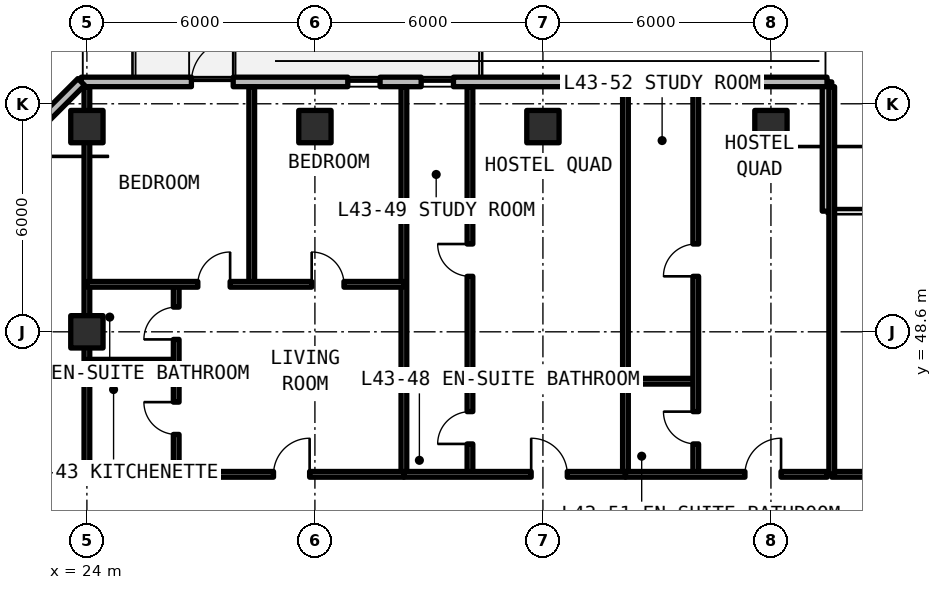
"""IFC4 building model, lengths in metres.
Left out: names, types, materials, properties, quantities, classifications, styles, units other than length and angle.
Written with IfcOpenShell. Run it as: python <this file> out.ifc"""

import sys

from ifc_helpers import new_model, si_unit, direction, frame, frame_2d, origin, origin_2d, place, context, subcontext, project, spatial, rectangle, extrude, element, fill, save


model = new_model("IFC4")
c1 = context("Model", 3, precision=1e-05, world=origin(), true_north=direction((0.0, 1.0)))
c2 = subcontext(c1, "Body", "Model", "MODEL_VIEW")
j1 = project(units=[si_unit("LENGTHUNIT", "METRE"), si_unit("PLANEANGLEUNIT", "RADIAN")], contexts=[c1])
p1 = place(None, origin())
s1 = spatial("IfcSite", under=j1, at=p1, CompositionType="ELEMENT")
p2 = place(p1, origin())
s2 = spatial("IfcBuilding", under=s1, at=p2, CompositionType="ELEMENT")
p3 = place(p2, frame((0.0, 0.0, 155.1)))
s3 = spatial("IfcBuildingStorey", under=s2, at=p3, CompositionType="ELEMENT", Elevation=155.1)
for number, where, z_axis, x_axis in (
    (1, (24.0, 48.6, 0.0), (0.0, 0.0, 1.0), (1.0, 0.0, 0.0)),
    (2, (24.0, 54.0, 0.0), (0.0, 0.0, 1.0), (1.0, 0.0, 0.0)),
    (3, (30.0, 54.0, 0.0), (0.0, 0.0, 1.0), (1.0, 0.0, 0.0)),
    (4, (36.0, 54.0, 0.0), (0.0, 0.0, 1.0), (1.0, 0.0, 0.0)),
    (5, (42.0, 54.0, 0.0), (0.0, 0.0, 1.0), (1.0, 0.0, 0.0)),
):
    element("IfcColumn", number, at=place(p3, frame(where, z_axis=z_axis, x_axis=x_axis)), inside=s3, PredefinedType="COLUMN", context=c2, shape_type="SweptSolid", body=[
        extrude(rectangle(XDim=0.85, YDim=0.85, at=origin_2d()), origin(), (0.0, 0.0, 1.0), 3.3),
    ])
p4 = place(p3, frame((43.475, 51.775, 0.0), z_axis=(0.0, 0.0, 1.0), x_axis=(0.0, 1.0, 0.0)))
e6 = element("IfcWall", 6, at=p4, inside=s3, PredefinedType="SOLIDWALL", context=c2, shape_type="SweptSolid", body=[
    extrude(rectangle(XDim=3.4, YDim=0.25, at=frame_2d((1.7, 0.0))), origin(), (0.0, 0.0, 1.0), 3.08),
])
p5 = place(p3, frame((43.475, 55.175, 0.0), z_axis=(0.0, 0.0, 1.0), x_axis=(-1.0, 0.0, 0.0)))
e7 = element("IfcWall", 7, at=p5, inside=s3, PredefinedType="SOLIDWALL", context=c2, shape_type="SweptSolid", body=[
    extrude(rectangle(XDim=19.623, YDim=0.25, at=frame_2d((9.812, 0.0))), origin(), (0.0, 0.0, 1.0), 3.08),
])
p6 = place(p5, frame((15.625, 0.0, 0.0)))
e8 = element("IfcOpeningElement", 8, at=p6, cuts=e7, PredefinedType="OPENING", context=c2, shape_type="SweptSolid", body=[
    extrude(rectangle(XDim=1.1, YDim=2.15, at=frame_2d((0.55, 1.075))), frame((0.0, 0.135, 0.0), z_axis=(0.0, -1.0, 0.0), x_axis=(1.0, 0.0, 0.0)), (0.0, 0.0, 1.0), 0.27),
])
p7 = place(p5, frame((11.76, 0.0, 0.78)))
e9 = element("IfcOpeningElement", 9, at=p7, cuts=e7, PredefinedType="OPENING", context=c2, shape_type="SweptSolid", body=[
    extrude(rectangle(XDim=0.85, YDim=1.65, at=frame_2d((0.425, 0.825))), frame((0.0, 0.135, 0.0), z_axis=(0.0, -1.0, 0.0), x_axis=(1.0, 0.0, 0.0)), (0.0, 0.0, 1.0), 0.27),
])
p8 = place(p5, frame((9.829, 0.0, 0.78)))
e10 = element("IfcOpeningElement", 10, at=p8, cuts=e7, PredefinedType="OPENING", context=c2, shape_type="SweptSolid", body=[
    extrude(rectangle(XDim=0.85, YDim=1.65, at=frame_2d((0.425, 0.825))), frame((0.0, 0.135, 0.0), z_axis=(0.0, -1.0, 0.0), x_axis=(1.0, 0.0, 0.0)), (0.0, 0.0, 1.0), 0.27),
])
p9 = place(p5, frame((5.974, 0.0, 0.78)))
e11 = element("IfcOpeningElement", 11, at=p9, cuts=e7, PredefinedType="OPENING", context=c2, shape_type="SweptSolid", body=[
    extrude(rectangle(XDim=0.85, YDim=1.65, at=frame_2d((0.425, 0.825))), frame((0.0, 0.135, 0.0), z_axis=(0.0, -1.0, 0.0), x_axis=(1.0, 0.0, 0.0)), (0.0, 0.0, 1.0), 0.27),
])
p10 = place(p5, frame((3.943, 0.0, 0.78)))
e12 = element("IfcOpeningElement", 12, at=p10, cuts=e7, PredefinedType="OPENING", context=c2, shape_type="SweptSolid", body=[
    extrude(rectangle(XDim=0.85, YDim=1.65, at=frame_2d((0.425, 0.825))), frame((0.0, 0.135, 0.0), z_axis=(0.0, -1.0, 0.0), x_axis=(1.0, 0.0, 0.0)), (0.0, 0.0, 1.0), 0.27),
])
p11 = place(p5, frame((2.109, 0.0, 0.78)))
e13 = element("IfcOpeningElement", 13, at=p11, cuts=e7, PredefinedType="OPENING", context=c2, shape_type="SweptSolid", body=[
    extrude(rectangle(XDim=0.85, YDim=1.65, at=frame_2d((0.425, 0.825))), frame((0.0, 0.135, 0.0), z_axis=(0.0, -1.0, 0.0), x_axis=(1.0, 0.0, 0.0)), (0.0, 0.0, 1.0), 0.27),
])
p12 = place(p3, frame((23.852, 55.175, 0.0), z_axis=(0.0, 0.0, 1.0), x_axis=(-0.70708586489, -0.707127696864, 0.0)))
e14 = element("IfcWall", 14, at=p12, inside=s3, PredefinedType="SOLIDWALL", context=c2, shape_type="SweptSolid", body=[
    extrude(rectangle(XDim=5.836, YDim=0.25, at=frame_2d((2.918, 0.0))), origin(), (0.0, 0.0, 1.0), 3.08),
])
p13 = place(p12, frame((1.538, 0.0, 0.78)))
e15 = element("IfcOpeningElement", 15, at=p13, cuts=e14, PredefinedType="OPENING", context=c2, shape_type="SweptSolid", body=[
    extrude(rectangle(XDim=3.4, YDim=1.66, at=frame_2d((1.7, 0.83))), frame((0.0, 0.135, 0.0), z_axis=(0.0, -1.0, 0.0), x_axis=(1.0, 0.0, 0.0)), (0.0, 0.0, 1.0), 0.27),
])
p14 = place(p3, frame((43.6, 44.85, 0.0), z_axis=(0.0, 0.0, 1.0), x_axis=(1.0, 0.0, 0.0)))
e16 = element("IfcWall", 16, at=p14, inside=s3, PredefinedType="SOLIDWALL", context=c2, shape_type="SweptSolid", body=[
    extrude(rectangle(XDim=8.4, YDim=0.15, at=frame_2d((4.2, 0.0))), origin(), (0.0, 0.0, 1.0), 2.35),
])
p15 = place(p14, frame((3.65, 0.0, 0.0)))
e17 = element("IfcOpeningElement", 17, at=p15, cuts=e16, PredefinedType="OPENING", context=c2, shape_type="SweptSolid", body=[
    extrude(rectangle(XDim=1.1, YDim=2.15, at=frame_2d((0.55, 1.075))), frame((0.0, 0.085, 0.0), z_axis=(0.0, -1.0, 0.0), x_axis=(1.0, 0.0, 0.0)), (0.0, 0.0, 1.0), 0.17),
])
for number, where, z_axis, x_axis in (
    (18, (43.6, 44.85, 0.0), (0.0, 0.0, 1.0), (0.0, 1.0, 0.0)),
    (19, (24.0, 44.85, 0.0), (0.0, 0.0, 1.0), (0.0, 1.0, 0.0)),
    (20, (32.342, 44.85, 0.0), (0.0, 0.0, 1.0), (0.0, 1.0, 0.0)),
):
    element("IfcWall", number, at=place(p3, frame(where, z_axis=z_axis, x_axis=x_axis)), inside=s3, PredefinedType="SOLIDWALL", context=c2, shape_type="SweptSolid", body=[
        extrude(rectangle(XDim=10.2, YDim=0.15, at=frame_2d((5.1, 0.0))), origin(), (0.0, 0.0, 1.0), 2.35),
    ])
p16 = place(p3, frame((24.0, 47.8, 0.0), z_axis=(0.0, 0.0, 1.0), x_axis=(1.0, 0.0, 0.0)))
e21 = element("IfcWall", 21, at=p16, inside=s3, PredefinedType="PARTITIONING", context=c2, shape_type="SweptSolid", body=[
    extrude(rectangle(XDim=2.35, YDim=0.15, at=frame_2d((1.175, 0.0))), origin(), (0.0, 0.0, 1.0), 2.35),
])
p17 = place(p3, frame((26.35, 44.85, 0.0), z_axis=(0.0, 0.0, 1.0), x_axis=(0.0, 1.0, 0.0)))
e22 = element("IfcWall", 22, at=p17, inside=s3, PredefinedType="PARTITIONING", context=c2, shape_type="SweptSolid", body=[
    extrude(rectangle(XDim=5.0, YDim=0.15, at=frame_2d((2.5, 0.0))), origin(), (0.0, 0.0, 1.0), 2.35),
])
p18 = place(p17, frame((1.05, 0.0, 0.0)))
e23 = element("IfcOpeningElement", 23, at=p18, cuts=e22, PredefinedType="OPENING", context=c2, shape_type="SweptSolid", body=[
    extrude(rectangle(XDim=0.85, YDim=2.1, at=frame_2d((0.425, 1.05))), frame((0.0, 0.085, 0.0), z_axis=(0.0, -1.0, 0.0), x_axis=(1.0, 0.0, 0.0)), (0.0, 0.0, 1.0), 0.17),
])
p19 = place(p17, frame((3.55, 0.0, 0.0)))
e24 = element("IfcOpeningElement", 24, at=p19, cuts=e22, PredefinedType="OPENING", context=c2, shape_type="SweptSolid", body=[
    extrude(rectangle(XDim=0.85, YDim=2.1, at=frame_2d((0.425, 1.05))), frame((0.0, 0.085, 0.0), z_axis=(0.0, -1.0, 0.0), x_axis=(1.0, 0.0, 0.0)), (0.0, 0.0, 1.0), 0.17),
])
p20 = place(p3, frame((28.338, 49.85, 0.0), z_axis=(0.0, 0.0, 1.0), x_axis=(0.0, 1.0, 0.0)))
e25 = element("IfcWall", 25, at=p20, inside=s3, PredefinedType="PARTITIONING", context=c2, shape_type="SweptSolid", body=[
    extrude(rectangle(XDim=5.2, YDim=0.15, at=frame_2d((2.6, 0.0))), origin(), (0.0, 0.0, 1.0), 2.35),
])
p21 = place(p3, frame((24.0, 49.85, 0.0), z_axis=(0.0, 0.0, 1.0), x_axis=(1.0, 0.0, 0.0)))
e26 = element("IfcWall", 26, at=p21, inside=s3, PredefinedType="PARTITIONING", context=c2, shape_type="SweptSolid", body=[
    extrude(rectangle(XDim=8.342, YDim=0.15, at=frame_2d((4.171, 0.0))), origin(), (0.0, 0.0, 1.0), 2.35),
])
p22 = place(p21, frame((2.919, 0.0, 0.0)))
e27 = element("IfcOpeningElement", 27, at=p22, cuts=e26, PredefinedType="OPENING", context=c2, shape_type="SweptSolid", body=[
    extrude(rectangle(XDim=0.85, YDim=2.1, at=frame_2d((0.425, 1.05))), frame((0.0, 0.085, 0.0), z_axis=(0.0, -1.0, 0.0), x_axis=(1.0, 0.0, 0.0)), (0.0, 0.0, 1.0), 0.17),
])
p23 = place(p21, frame((5.915, 0.0, 0.0)))
e28 = element("IfcOpeningElement", 28, at=p23, cuts=e26, PredefinedType="OPENING", context=c2, shape_type="SweptSolid", body=[
    extrude(rectangle(XDim=0.85, YDim=2.1, at=frame_2d((0.425, 1.05))), frame((0.0, 0.085, 0.0), z_axis=(0.0, -1.0, 0.0), x_axis=(1.0, 0.0, 0.0)), (0.0, 0.0, 1.0), 0.17),
])
p24 = place(p3, frame((24.0, 44.85, 0.0), z_axis=(0.0, 0.0, 1.0), x_axis=(1.0, 0.0, 0.0)))
e29 = element("IfcWall", 29, at=p24, inside=s3, PredefinedType="SOLIDWALL", context=c2, shape_type="SweptSolid", body=[
    extrude(rectangle(XDim=8.342, YDim=0.15, at=frame_2d((4.171, 0.0))), origin(), (0.0, 0.0, 1.0), 2.35),
])
p25 = place(p24, frame((4.911, 0.0, 0.0)))
e30 = element("IfcOpeningElement", 30, at=p25, cuts=e29, PredefinedType="OPENING", context=c2, shape_type="SweptSolid", body=[
    extrude(rectangle(XDim=0.95, YDim=2.15, at=frame_2d((0.475, 1.075))), frame((0.0, 0.085, 0.0), z_axis=(0.0, -1.0, 0.0), x_axis=(1.0, 0.0, 0.0)), (0.0, 0.0, 1.0), 0.17),
])
p26 = place(p3, frame((38.172, 44.85, 0.0), z_axis=(0.0, 0.0, 1.0), x_axis=(0.0, 1.0, 0.0)))
e31 = element("IfcWall", 31, at=p26, inside=s3, PredefinedType="SOLIDWALL", context=c2, shape_type="SweptSolid", body=[
    extrude(rectangle(XDim=10.2, YDim=0.15, at=frame_2d((5.1, 0.0))), origin(), (0.0, 0.0, 1.0), 2.35),
])
p27 = place(p3, frame((32.342, 47.3, 0.0), z_axis=(0.0, 0.0, 1.0), x_axis=(1.0, 0.0, 0.0)))
e32 = element("IfcWall", 32, at=p27, inside=s3, PredefinedType="PARTITIONING", context=c2, shape_type="SweptSolid", body=[
    extrude(rectangle(XDim=1.738, YDim=0.15, at=frame_2d((0.869, 0.0))), origin(), (0.0, 0.0, 1.0), 2.35),
])
p28 = place(p3, frame((34.08, 44.85, 0.0), z_axis=(0.0, 0.0, 1.0), x_axis=(0.0, 1.0, 0.0)))
e33 = element("IfcWall", 33, at=p28, inside=s3, PredefinedType="PARTITIONING", context=c2, shape_type="SweptSolid", body=[
    extrude(rectangle(XDim=10.2, YDim=0.15, at=frame_2d((5.1, 0.0))), origin(), (0.0, 0.0, 1.0), 2.35),
])
p29 = place(p28, frame((0.8, 0.0, 0.0)))
e34 = element("IfcOpeningElement", 34, at=p29, cuts=e33, PredefinedType="OPENING", context=c2, shape_type="SweptSolid", body=[
    extrude(rectangle(XDim=0.85, YDim=2.1, at=frame_2d((0.425, 1.05))), frame((0.0, 0.085, 0.0), z_axis=(0.0, -1.0, 0.0), x_axis=(1.0, 0.0, 0.0)), (0.0, 0.0, 1.0), 0.17),
])
p30 = place(p28, frame((5.21, 0.0, 0.0)))
e35 = element("IfcOpeningElement", 35, at=p30, cuts=e33, PredefinedType="OPENING", context=c2, shape_type="SweptSolid", body=[
    extrude(rectangle(XDim=0.85, YDim=2.1, at=frame_2d((0.425, 1.05))), frame((0.0, 0.085, 0.0), z_axis=(0.0, -1.0, 0.0), x_axis=(1.0, 0.0, 0.0)), (0.0, 0.0, 1.0), 0.17),
])
p31 = place(p3, frame((32.342, 44.85, 0.0), z_axis=(0.0, 0.0, 1.0), x_axis=(1.0, 0.0, 0.0)))
e36 = element("IfcWall", 36, at=p31, inside=s3, PredefinedType="SOLIDWALL", context=c2, shape_type="SweptSolid", body=[
    extrude(rectangle(XDim=5.83, YDim=0.15, at=frame_2d((2.915, 0.0))), origin(), (0.0, 0.0, 1.0), 2.35),
])
p32 = place(p31, frame((3.349, 0.0, 0.0)))
e37 = element("IfcOpeningElement", 37, at=p32, cuts=e36, PredefinedType="OPENING", context=c2, shape_type="SweptSolid", body=[
    extrude(rectangle(XDim=0.95, YDim=2.15, at=frame_2d((0.475, 1.075))), frame((0.0, 0.085, 0.0), z_axis=(0.0, -1.0, 0.0), x_axis=(1.0, 0.0, 0.0)), (0.0, 0.0, 1.0), 0.17),
])
p33 = place(p3, frame((38.172, 47.3, 0.0), z_axis=(0.0, 0.0, 1.0), x_axis=(1.0, 0.0, 0.0)))
e38 = element("IfcWall", 38, at=p33, inside=s3, PredefinedType="PARTITIONING", context=c2, shape_type="SweptSolid", body=[
    extrude(rectangle(XDim=1.85, YDim=0.15, at=frame_2d((0.925, 0.0))), origin(), (0.0, 0.0, 1.0), 2.35),
])
p34 = place(p3, frame((40.021, 44.85, 0.0), z_axis=(0.0, 0.0, 1.0), x_axis=(0.0, 1.0, 0.0)))
e39 = element("IfcWall", 39, at=p34, inside=s3, PredefinedType="PARTITIONING", context=c2, shape_type="SweptSolid", body=[
    extrude(rectangle(XDim=10.2, YDim=0.15, at=frame_2d((5.1, 0.0))), origin(), (0.0, 0.0, 1.0), 2.35),
])
p35 = place(p34, frame((0.8, 0.0, 0.0)))
e40 = element("IfcOpeningElement", 40, at=p35, cuts=e39, PredefinedType="OPENING", context=c2, shape_type="SweptSolid", body=[
    extrude(rectangle(XDim=0.85, YDim=2.1, at=frame_2d((0.425, 1.05))), frame((0.0, 0.085, 0.0), z_axis=(0.0, -1.0, 0.0), x_axis=(1.0, 0.0, 0.0)), (0.0, 0.0, 1.0), 0.17),
])
p36 = place(p34, frame((5.21, 0.0, 0.0)))
e41 = element("IfcOpeningElement", 41, at=p36, cuts=e39, PredefinedType="OPENING", context=c2, shape_type="SweptSolid", body=[
    extrude(rectangle(XDim=0.85, YDim=2.1, at=frame_2d((0.425, 1.05))), frame((0.0, 0.085, 0.0), z_axis=(0.0, -1.0, 0.0), x_axis=(1.0, 0.0, 0.0)), (0.0, 0.0, 1.0), 0.17),
])
p37 = place(p3, frame((38.172, 44.85, 0.0), z_axis=(0.0, 0.0, 1.0), x_axis=(1.0, 0.0, 0.0)))
e42 = element("IfcWall", 42, at=p37, inside=s3, PredefinedType="SOLIDWALL", context=c2, shape_type="SweptSolid", body=[
    extrude(rectangle(XDim=5.308, YDim=0.15, at=frame_2d((2.654, 0.0))), origin(), (0.0, 0.0, 1.0), 2.35),
])
p38 = place(p37, frame((3.144, 0.0, 0.0)))
e43 = element("IfcOpeningElement", 43, at=p38, cuts=e42, PredefinedType="OPENING", context=c2, shape_type="SweptSolid", body=[
    extrude(rectangle(XDim=0.95, YDim=2.15, at=frame_2d((0.475, 1.075))), frame((0.0, 0.085, 0.0), z_axis=(0.0, -1.0, 0.0), x_axis=(1.0, 0.0, 0.0)), (0.0, 0.0, 1.0), 0.17),
])
p39 = place(p6, frame((1.1, 0.0, 0.0), z_axis=(0.0, 0.0, 1.0), x_axis=(-1.0, 0.0, 0.0)))
e44 = element("IfcDoor", 44, at=p39, inside=s3, OperationType="SINGLE_SWING_LEFT", PredefinedType="DOOR", context=c2, shape_type="SweptSolid", body=[
    extrude(rectangle(XDim=1.1, YDim=2.15, at=frame_2d((0.55, 1.075))), frame((0.0, 0.025, 0.0), z_axis=(0.0, -1.0, 0.0), x_axis=(1.0, 0.0, 0.0)), (0.0, 0.0, 1.0), 0.05),
])
fill(e8, e44)
p40 = place(p7, origin())
e45 = element("IfcWindow", 45, at=p40, inside=s3, PartitioningType="SINGLE_PANEL", PredefinedType="WINDOW", context=c2, shape_type="SweptSolid", body=[
    extrude(rectangle(XDim=0.85, YDim=1.65, at=frame_2d((0.425, 0.825))), frame((0.0, 0.03, 0.0), z_axis=(0.0, -1.0, 0.0), x_axis=(1.0, 0.0, 0.0)), (0.0, 0.0, 1.0), 0.06),
])
fill(e9, e45)
p41 = place(p8, origin())
e46 = element("IfcWindow", 46, at=p41, inside=s3, PartitioningType="SINGLE_PANEL", PredefinedType="WINDOW", context=c2, shape_type="SweptSolid", body=[
    extrude(rectangle(XDim=0.85, YDim=1.65, at=frame_2d((0.425, 0.825))), frame((0.0, 0.03, 0.0), z_axis=(0.0, -1.0, 0.0), x_axis=(1.0, 0.0, 0.0)), (0.0, 0.0, 1.0), 0.06),
])
fill(e10, e46)
p42 = place(p9, origin())
e47 = element("IfcWindow", 47, at=p42, inside=s3, PartitioningType="SINGLE_PANEL", PredefinedType="WINDOW", context=c2, shape_type="SweptSolid", body=[
    extrude(rectangle(XDim=0.85, YDim=1.65, at=frame_2d((0.425, 0.825))), frame((0.0, 0.03, 0.0), z_axis=(0.0, -1.0, 0.0), x_axis=(1.0, 0.0, 0.0)), (0.0, 0.0, 1.0), 0.06),
])
fill(e11, e47)
p43 = place(p10, origin())
e48 = element("IfcWindow", 48, at=p43, inside=s3, PartitioningType="SINGLE_PANEL", PredefinedType="WINDOW", context=c2, shape_type="SweptSolid", body=[
    extrude(rectangle(XDim=0.85, YDim=1.65, at=frame_2d((0.425, 0.825))), frame((0.0, 0.03, 0.0), z_axis=(0.0, -1.0, 0.0), x_axis=(1.0, 0.0, 0.0)), (0.0, 0.0, 1.0), 0.06),
])
fill(e12, e48)
p44 = place(p11, origin())
e49 = element("IfcWindow", 49, at=p44, inside=s3, PartitioningType="SINGLE_PANEL", PredefinedType="WINDOW", context=c2, shape_type="SweptSolid", body=[
    extrude(rectangle(XDim=0.85, YDim=1.65, at=frame_2d((0.425, 0.825))), frame((0.0, 0.03, 0.0), z_axis=(0.0, -1.0, 0.0), x_axis=(1.0, 0.0, 0.0)), (0.0, 0.0, 1.0), 0.06),
])
fill(e13, e49)
p45 = place(p18, origin())
e50 = element("IfcDoor", 50, at=p45, inside=s3, OperationType="SINGLE_SWING_RIGHT", PredefinedType="DOOR", context=c2, shape_type="SweptSolid", body=[
    extrude(rectangle(XDim=0.85, YDim=2.1, at=frame_2d((0.425, 1.05))), frame((0.0, 0.025, 0.0), z_axis=(0.0, -1.0, 0.0), x_axis=(1.0, 0.0, 0.0)), (0.0, 0.0, 1.0), 0.05),
])
fill(e23, e50)
p46 = place(p19, origin())
e51 = element("IfcDoor", 51, at=p46, inside=s3, OperationType="SINGLE_SWING_LEFT", PredefinedType="DOOR", context=c2, shape_type="SweptSolid", body=[
    extrude(rectangle(XDim=0.85, YDim=2.1, at=frame_2d((0.425, 1.05))), frame((0.0, 0.025, 0.0), z_axis=(0.0, -1.0, 0.0), x_axis=(1.0, 0.0, 0.0)), (0.0, 0.0, 1.0), 0.05),
])
fill(e24, e51)
p47 = place(p22, origin())
e52 = element("IfcDoor", 52, at=p47, inside=s3, OperationType="SINGLE_SWING_RIGHT", PredefinedType="DOOR", context=c2, shape_type="SweptSolid", body=[
    extrude(rectangle(XDim=0.85, YDim=2.1, at=frame_2d((0.425, 1.05))), frame((0.0, 0.025, 0.0), z_axis=(0.0, -1.0, 0.0), x_axis=(1.0, 0.0, 0.0)), (0.0, 0.0, 1.0), 0.05),
])
fill(e27, e52)
p48 = place(p23, origin())
e53 = element("IfcDoor", 53, at=p48, inside=s3, OperationType="SINGLE_SWING_LEFT", PredefinedType="DOOR", context=c2, shape_type="SweptSolid", body=[
    extrude(rectangle(XDim=0.85, YDim=2.1, at=frame_2d((0.425, 1.05))), frame((0.0, 0.025, 0.0), z_axis=(0.0, -1.0, 0.0), x_axis=(1.0, 0.0, 0.0)), (0.0, 0.0, 1.0), 0.05),
])
fill(e28, e53)
p49 = place(p25, origin())
e54 = element("IfcDoor", 54, at=p49, inside=s3, OperationType="SINGLE_SWING_RIGHT", PredefinedType="DOOR", context=c2, shape_type="SweptSolid", body=[
    extrude(rectangle(XDim=0.95, YDim=2.15, at=frame_2d((0.475, 1.075))), frame((0.0, 0.025, 0.0), z_axis=(0.0, -1.0, 0.0), x_axis=(1.0, 0.0, 0.0)), (0.0, 0.0, 1.0), 0.05),
])
fill(e30, e54)
p50 = place(p29, origin())
e55 = element("IfcDoor", 55, at=p50, inside=s3, OperationType="SINGLE_SWING_LEFT", PredefinedType="DOOR", context=c2, shape_type="SweptSolid", body=[
    extrude(rectangle(XDim=0.85, YDim=2.1, at=frame_2d((0.425, 1.05))), frame((0.0, 0.025, 0.0), z_axis=(0.0, -1.0, 0.0), x_axis=(1.0, 0.0, 0.0)), (0.0, 0.0, 1.0), 0.05),
])
fill(e34, e55)
p51 = place(p30, origin())
e56 = element("IfcDoor", 56, at=p51, inside=s3, OperationType="SINGLE_SWING_RIGHT", PredefinedType="DOOR", context=c2, shape_type="SweptSolid", body=[
    extrude(rectangle(XDim=0.85, YDim=2.1, at=frame_2d((0.425, 1.05))), frame((0.0, 0.025, 0.0), z_axis=(0.0, -1.0, 0.0), x_axis=(1.0, 0.0, 0.0)), (0.0, 0.0, 1.0), 0.05),
])
fill(e35, e56)
p52 = place(p32, origin())
e57 = element("IfcDoor", 57, at=p52, inside=s3, OperationType="SINGLE_SWING_LEFT", PredefinedType="DOOR", context=c2, shape_type="SweptSolid", body=[
    extrude(rectangle(XDim=0.95, YDim=2.15, at=frame_2d((0.475, 1.075))), frame((0.0, 0.025, 0.0), z_axis=(0.0, -1.0, 0.0), x_axis=(1.0, 0.0, 0.0)), (0.0, 0.0, 1.0), 0.05),
])
fill(e37, e57)
p53 = place(p35, origin())
e58 = element("IfcDoor", 58, at=p53, inside=s3, OperationType="SINGLE_SWING_RIGHT", PredefinedType="DOOR", context=c2, shape_type="SweptSolid", body=[
    extrude(rectangle(XDim=0.85, YDim=2.1, at=frame_2d((0.425, 1.05))), frame((0.0, 0.025, 0.0), z_axis=(0.0, -1.0, 0.0), x_axis=(1.0, 0.0, 0.0)), (0.0, 0.0, 1.0), 0.05),
])
fill(e40, e58)
p54 = place(p36, origin())
e59 = element("IfcDoor", 59, at=p54, inside=s3, OperationType="SINGLE_SWING_LEFT", PredefinedType="DOOR", context=c2, shape_type="SweptSolid", body=[
    extrude(rectangle(XDim=0.85, YDim=2.1, at=frame_2d((0.425, 1.05))), frame((0.0, 0.025, 0.0), z_axis=(0.0, -1.0, 0.0), x_axis=(1.0, 0.0, 0.0)), (0.0, 0.0, 1.0), 0.05),
])
fill(e41, e59)
p55 = place(p38, origin())
e60 = element("IfcDoor", 60, at=p55, inside=s3, OperationType="SINGLE_SWING_RIGHT", PredefinedType="DOOR", context=c2, shape_type="SweptSolid", body=[
    extrude(rectangle(XDim=0.95, YDim=2.15, at=frame_2d((0.475, 1.075))), frame((0.0, 0.025, 0.0), z_axis=(0.0, -1.0, 0.0), x_axis=(1.0, 0.0, 0.0)), (0.0, 0.0, 1.0), 0.05),
])
fill(e43, e60)
save(model, sys.argv[1])
